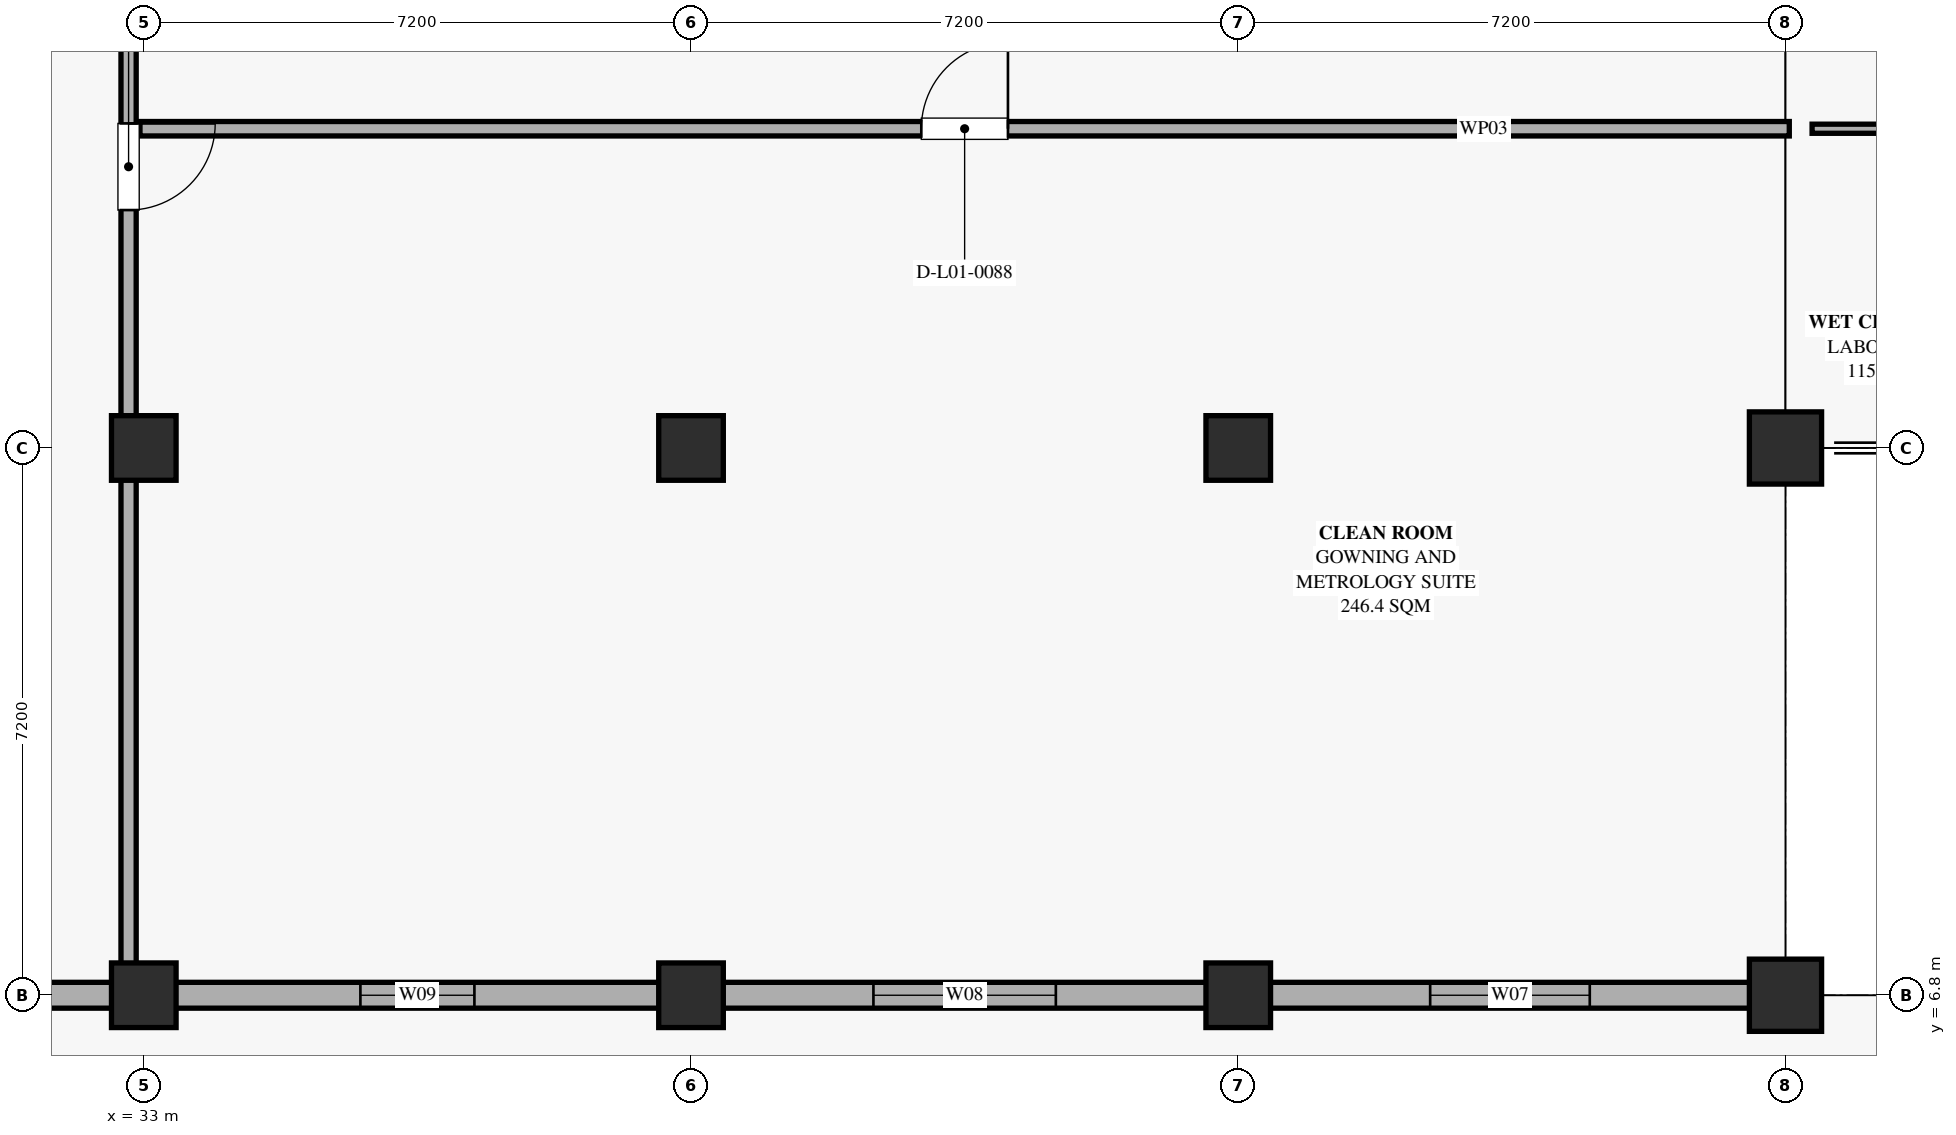
"""IFC4 building model, lengths in metres.
Left out: names, types, materials, properties, quantities, classifications, styles, units other than length and angle.
Written with IfcOpenShell. Run it as: python <this file> out.ifc"""

import sys

from ifc_helpers import new_model, si_unit, direction, frame, frame_2d, origin, origin_2d, place, context, subcontext, project, spatial, rectangle, extrude, element, fill, save


model = new_model("IFC4")
c1 = context("Model", 3, precision=1e-05, world=origin(), true_north=direction((0.0, 1.0)))
c2 = subcontext(c1, "Body", "Model", "MODEL_VIEW")
j1 = project(units=[si_unit("LENGTHUNIT", "METRE"), si_unit("PLANEANGLEUNIT", "RADIAN")], contexts=[c1])
p1 = place(None, origin())
s1 = spatial("IfcSite", under=j1, at=p1, CompositionType="ELEMENT")
p2 = place(p1, origin())
s2 = spatial("IfcBuilding", under=s1, at=p2, CompositionType="ELEMENT")
p3 = place(p2, frame((0.0, 0.0, 5.4)))
s3 = spatial("IfcBuildingStorey", under=s2, at=p3, CompositionType="ELEMENT", Elevation=5.4)
for number, where, z_axis, x_axis in (
    (1, (33.0, 6.8, 0.0), (0.0, 0.0, 1.0), (1.0, 0.0, 0.0)),
    (2, (40.2, 6.8, 0.0), (0.0, 0.0, 1.0), (1.0, 0.0, 0.0)),
    (3, (47.4, 6.8, 0.0), (0.0, 0.0, 1.0), (1.0, 0.0, 0.0)),
):
    element("IfcColumn", number, at=place(p3, frame(where, z_axis=z_axis, x_axis=x_axis)), inside=s3, PredefinedType="COLUMN", context=c2, shape_type="SweptSolid", body=[
        extrude(rectangle(XDim=0.85, YDim=0.85, at=origin_2d()), origin(), (0.0, 0.0, 1.0), 5.04),
    ])
p4 = place(p3, frame((54.6, 6.8, 0.0), z_axis=(0.0, 0.0, 1.0), x_axis=(1.0, 0.0, 0.0)))
e4 = element("IfcColumn", 4, at=p4, inside=s3, PredefinedType="COLUMN", context=c2, shape_type="SweptSolid", body=[
    extrude(rectangle(XDim=0.95, YDim=0.95, at=origin_2d()), origin(), (0.0, 0.0, 1.0), 5.04),
])
for number, where, z_axis, x_axis in (
    (5, (33.0, 14.0, 0.0), (0.0, 0.0, 1.0), (1.0, 0.0, 0.0)),
    (6, (40.2, 14.0, 0.0), (0.0, 0.0, 1.0), (1.0, 0.0, 0.0)),
    (7, (47.4, 14.0, 0.0), (0.0, 0.0, 1.0), (1.0, 0.0, 0.0)),
):
    element("IfcColumn", number, at=place(p3, frame(where, z_axis=z_axis, x_axis=x_axis)), inside=s3, PredefinedType="COLUMN", context=c2, shape_type="SweptSolid", body=[
        extrude(rectangle(XDim=0.85, YDim=0.85, at=origin_2d()), origin(), (0.0, 0.0, 1.0), 5.04),
    ])
p5 = place(p3, frame((54.6, 14.0, 0.0), z_axis=(0.0, 0.0, 1.0), x_axis=(1.0, 0.0, 0.0)))
e8 = element("IfcColumn", 8, at=p5, inside=s3, PredefinedType="COLUMN", context=c2, shape_type="SweptSolid", body=[
    extrude(rectangle(XDim=0.95, YDim=0.95, at=origin_2d()), origin(), (0.0, 0.0, 1.0), 5.04),
])
p6 = place(p3, frame((54.14, 6.8, 0.0), z_axis=(0.0, 0.0, 1.0), x_axis=(-1.0, 0.0, 0.0)))
e9 = element("IfcWall", 9, at=p6, inside=s3, PredefinedType="SOLIDWALL", context=c2, shape_type="SweptSolid", body=[
    extrude(rectangle(XDim=6.33, YDim=0.34, at=frame_2d((3.165, 0.0))), origin(), (0.0, 0.0, 1.0), 3.54),
])
p7 = place(p6, frame((2.115, 0.0, 0.9)))
e10 = element("IfcOpeningElement", 10, at=p7, cuts=e9, PredefinedType="OPENING", context=c2, shape_type="SweptSolid", body=[
    extrude(rectangle(XDim=2.1, YDim=2.1, at=frame_2d((1.05, 1.05))), frame((0.0, 0.18, 0.0), z_axis=(0.0, -1.0, 0.0), x_axis=(1.0, 0.0, 0.0)), (0.0, 0.0, 1.0), 0.36),
])
p8 = place(p3, frame((46.99, 6.8, 0.0), z_axis=(0.0, 0.0, 1.0), x_axis=(-1.0, 0.0, 0.0)))
e11 = element("IfcWall", 11, at=p8, inside=s3, PredefinedType="SOLIDWALL", context=c2, shape_type="SweptSolid", body=[
    extrude(rectangle(XDim=6.38, YDim=0.34, at=frame_2d((3.19, 0.0))), origin(), (0.0, 0.0, 1.0), 3.54),
])
p9 = place(p8, frame((1.99, 0.0, 0.9)))
e12 = element("IfcOpeningElement", 12, at=p9, cuts=e11, PredefinedType="OPENING", context=c2, shape_type="SweptSolid", body=[
    extrude(rectangle(XDim=2.4, YDim=2.1, at=frame_2d((1.2, 1.05))), frame((0.0, 0.18, 0.0), z_axis=(0.0, -1.0, 0.0), x_axis=(1.0, 0.0, 0.0)), (0.0, 0.0, 1.0), 0.36),
])
p10 = place(p3, frame((39.79, 6.8, 0.0), z_axis=(0.0, 0.0, 1.0), x_axis=(-1.0, 0.0, 0.0)))
e13 = element("IfcWall", 13, at=p10, inside=s3, PredefinedType="SOLIDWALL", context=c2, shape_type="SweptSolid", body=[
    extrude(rectangle(XDim=6.38, YDim=0.34, at=frame_2d((3.19, 0.0))), origin(), (0.0, 0.0, 1.0), 3.54),
])
p11 = place(p10, frame((2.44, 0.0, 0.9)))
e14 = element("IfcOpeningElement", 14, at=p11, cuts=e13, PredefinedType="OPENING", context=c2, shape_type="SweptSolid", body=[
    extrude(rectangle(XDim=1.5, YDim=2.1, at=frame_2d((0.75, 1.05))), frame((0.0, 0.18, 0.0), z_axis=(0.0, -1.0, 0.0), x_axis=(1.0, 0.0, 0.0)), (0.0, 0.0, 1.0), 0.36),
])
p12 = place(p3, frame((32.59, 6.8, 0.0), z_axis=(0.0, 0.0, 1.0), x_axis=(-1.0, 0.0, 0.0)))
e15 = element("IfcWall", 15, at=p12, inside=s3, PredefinedType="SOLIDWALL", context=c2, shape_type="SweptSolid", body=[
    extrude(rectangle(XDim=6.38, YDim=0.34, at=frame_2d((3.19, 0.0))), origin(), (0.0, 0.0, 1.0), 3.54),
])
p13 = place(p12, frame((2.44, 0.0, 0.0)))
e16 = element("IfcOpeningElement", 16, at=p13, cuts=e15, PredefinedType="OPENING", context=c2, shape_type="SweptSolid", body=[
    extrude(rectangle(XDim=1.5, YDim=2.2, at=frame_2d((0.75, 1.1))), frame((0.0, 0.18, 0.0), z_axis=(0.0, -1.0, 0.0), x_axis=(1.0, 0.0, 0.0)), (0.0, 0.0, 1.0), 0.36),
])
p14 = place(p3, frame((54.95, 18.2, 0.0), z_axis=(0.0, 0.0, 1.0), x_axis=(1.0, 0.0, 0.0)))
e17 = element("IfcWall", 17, at=p14, inside=s3, PredefinedType="PARTITIONING", context=c2, shape_type="SweptSolid", body=[
    extrude(rectangle(XDim=28.3, YDim=0.12, at=frame_2d((14.15, 0.0))), origin(), (0.0, 0.0, 1.0), 3.52),
])
p15 = place(p14, frame((2.695, 0.0, 0.0)))
e18 = element("IfcOpeningElement", 18, at=p15, cuts=e17, PredefinedType="OPENING", context=c2, shape_type="SweptSolid", body=[
    extrude(rectangle(XDim=1.11, YDim=2.1, at=frame_2d((0.555, 1.05))), frame((0.0, 0.07, 0.0), z_axis=(0.0, -1.0, 0.0), x_axis=(1.0, 0.0, 0.0)), (0.0, 0.0, 1.0), 0.14),
])
p16 = place(p3, frame((32.8, 28.25, 0.0), z_axis=(0.0, 0.0, 1.0), x_axis=(0.0, -1.0, 0.0)))
e19 = element("IfcWall", 19, at=p16, inside=s3, PredefinedType="PARTITIONING", context=c2, shape_type="SweptSolid", body=[
    extrude(rectangle(XDim=21.1, YDim=0.2, at=frame_2d((10.55, 0.0))), origin(), (0.0, 0.0, 1.0), 3.52),
])
p17 = place(p16, frame((9.98, 0.0, 0.0)))
e20 = element("IfcOpeningElement", 20, at=p17, cuts=e19, PredefinedType="OPENING", context=c2, shape_type="SweptSolid", body=[
    extrude(rectangle(XDim=1.14, YDim=2.12, at=frame_2d((0.57, 1.06))), frame((0.0, 0.11, 0.0), z_axis=(0.0, -1.0, 0.0), x_axis=(1.0, 0.0, 0.0)), (0.0, 0.0, 1.0), 0.22),
])
p18 = place(p3, frame((32.95, 18.2, 0.0), z_axis=(0.0, 0.0, 1.0), x_axis=(1.0, 0.0, 0.0)))
e21 = element("IfcWall", 21, at=p18, inside=s3, PredefinedType="PARTITIONING", context=c2, shape_type="SweptSolid", body=[
    extrude(rectangle(XDim=21.7, YDim=0.19, at=frame_2d((10.85, 0.0))), origin(), (0.0, 0.0, 1.0), 3.52),
])
p19 = place(p18, frame((10.28, 0.0, 0.0)))
e22 = element("IfcOpeningElement", 22, at=p19, cuts=e21, PredefinedType="OPENING", context=c2, shape_type="SweptSolid", body=[
    extrude(rectangle(XDim=1.14, YDim=2.18, at=frame_2d((0.57, 1.09))), frame((0.0, 0.105, 0.0), z_axis=(0.0, -1.0, 0.0), x_axis=(1.0, 0.0, 0.0)), (0.0, 0.0, 1.0), 0.21),
])
p20 = place(p7, origin())
e23 = element("IfcWindow", 23, at=p20, inside=s3, PartitioningType="DOUBLE_PANEL_VERTICAL", PredefinedType="WINDOW", context=c2, shape_type="SweptSolid", body=[
    extrude(rectangle(XDim=2.1, YDim=2.1, at=frame_2d((1.05, 1.05))), frame((0.0, 0.03, 0.0), z_axis=(0.0, -1.0, 0.0), x_axis=(1.0, 0.0, 0.0)), (0.0, 0.0, 1.0), 0.06),
])
fill(e10, e23)
p21 = place(p9, origin())
e24 = element("IfcWindow", 24, at=p21, inside=s3, PartitioningType="DOUBLE_PANEL_VERTICAL", PredefinedType="WINDOW", context=c2, shape_type="SweptSolid", body=[
    extrude(rectangle(XDim=2.4, YDim=2.1, at=frame_2d((1.2, 1.05))), frame((0.0, 0.03, 0.0), z_axis=(0.0, -1.0, 0.0), x_axis=(1.0, 0.0, 0.0)), (0.0, 0.0, 1.0), 0.06),
])
fill(e12, e24)
p22 = place(p11, origin())
e25 = element("IfcWindow", 25, at=p22, inside=s3, PartitioningType="SINGLE_PANEL", PredefinedType="WINDOW", context=c2, shape_type="SweptSolid", body=[
    extrude(rectangle(XDim=1.5, YDim=2.1, at=frame_2d((0.75, 1.05))), frame((0.0, 0.03, 0.0), z_axis=(0.0, -1.0, 0.0), x_axis=(1.0, 0.0, 0.0)), (0.0, 0.0, 1.0), 0.06),
])
fill(e14, e25)
p23 = place(p17, origin())
e26 = element("IfcDoor", 26, at=p23, inside=s3, OperationType="SINGLE_SWING_LEFT", PredefinedType="DOOR", context=c2, shape_type="SweptSolid", body=[
    extrude(rectangle(XDim=1.14, YDim=2.12, at=frame_2d((0.57, 1.06))), frame((0.0, 0.025, 0.0), z_axis=(0.0, -1.0, 0.0), x_axis=(1.0, 0.0, 0.0)), (0.0, 0.0, 1.0), 0.05),
])
fill(e20, e26)
p24 = place(p19, origin())
e27 = element("IfcDoor", 27, at=p24, inside=s3, OperationType="SINGLE_SWING_RIGHT", PredefinedType="DOOR", context=c2, shape_type="SweptSolid", body=[
    extrude(rectangle(XDim=1.14, YDim=2.18, at=frame_2d((0.57, 1.09))), frame((0.0, 0.025, 0.0), z_axis=(0.0, -1.0, 0.0), x_axis=(1.0, 0.0, 0.0)), (0.0, 0.0, 1.0), 0.05),
])
fill(e22, e27)
save(model, sys.argv[1])
